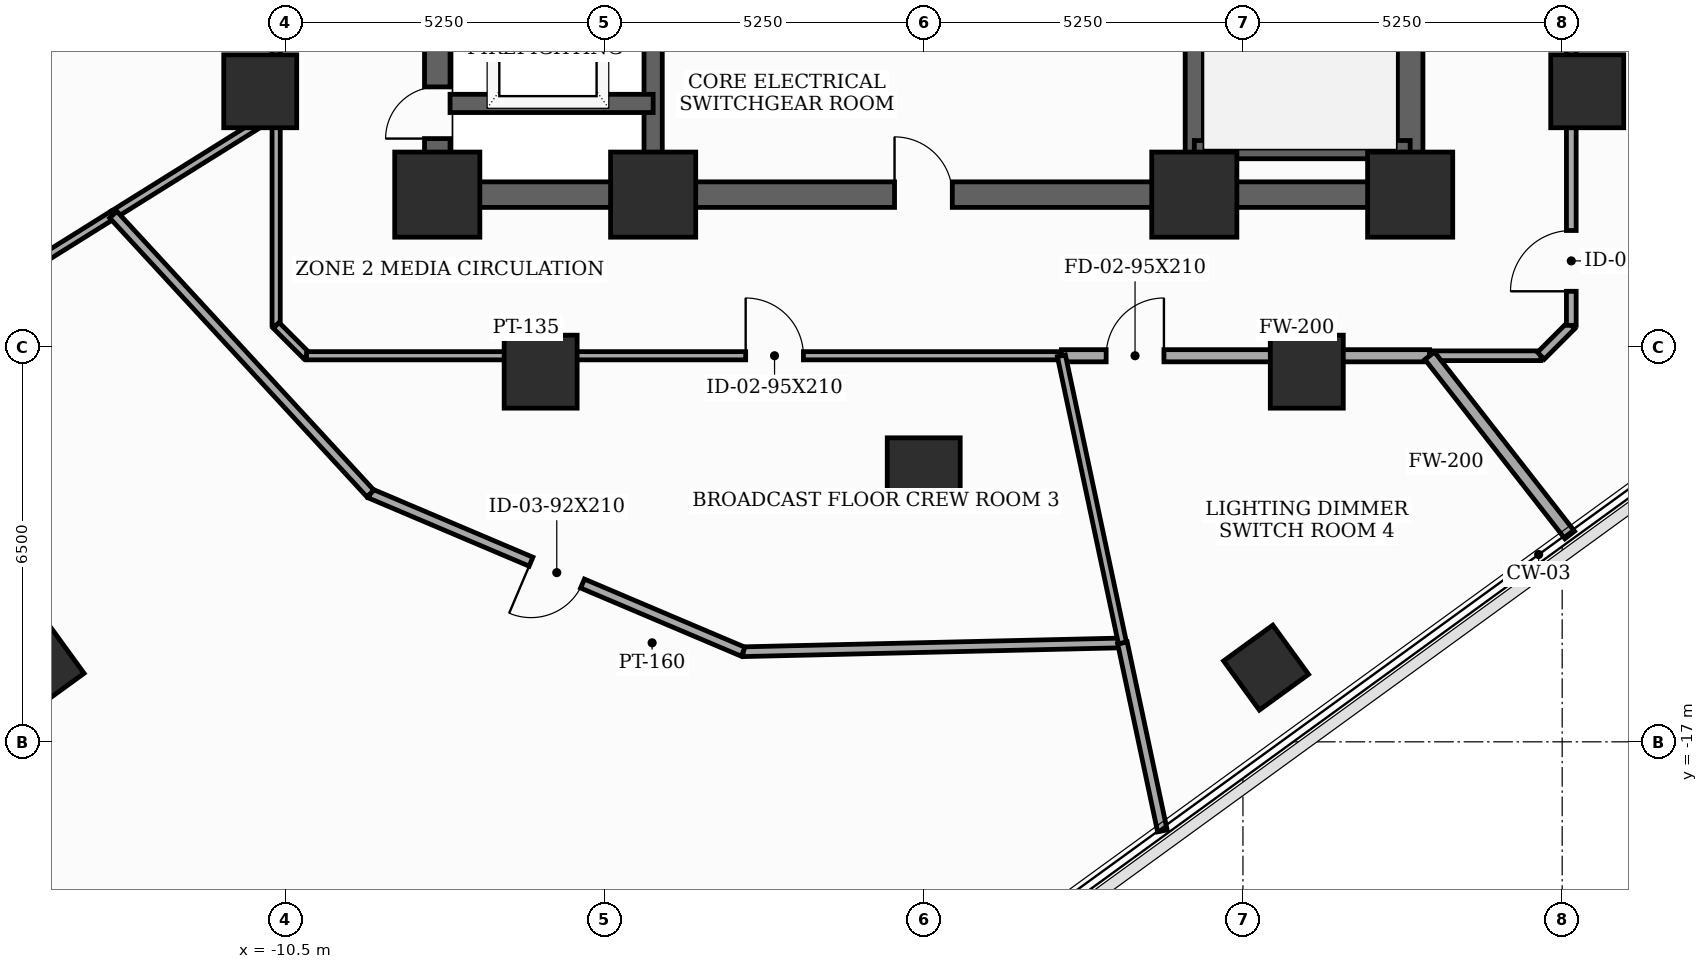
"""IFC4 building model, lengths in metres.
Left out: names, types, materials, properties, quantities, classifications, styles, units other than length and angle.
Written with IfcOpenShell. Run it as: python <this file> out.ifc"""

import sys

from ifc_helpers import new_model, si_unit, direction, frame, frame_2d, origin, origin_2d, place, context, subcontext, project, spatial, rectangle, extrude, element, fill, save


model = new_model("IFC4")
c1 = context("Model", 3, precision=1e-05, world=origin(), true_north=direction((0.0, 1.0)))
c2 = subcontext(c1, "Body", "Model", "MODEL_VIEW")
j1 = project(units=[si_unit("LENGTHUNIT", "METRE"), si_unit("PLANEANGLEUNIT", "RADIAN")], contexts=[c1])
p1 = place(None, origin())
s1 = spatial("IfcSite", under=j1, at=p1, CompositionType="ELEMENT")
p2 = place(p1, origin())
s2 = spatial("IfcBuilding", under=s1, at=p2, CompositionType="ELEMENT")
p3 = place(p2, frame((0.0, 0.0, 154.6)))
s3 = spatial("IfcBuildingStorey", under=s2, at=p3, CompositionType="ELEMENT", Elevation=154.6)
for number, where, z_axis, x_axis in (
    (1, (-8.0, -8.0, 0.0), (0.0, 0.0, 1.0), (1.0, 0.0, 0.0)),
    (2, (-4.45, -8.0, 0.0), (0.0, 0.0, 1.0), (1.0, 0.0, 0.0)),
    (3, (4.45, -8.0, 0.0), (0.0, 0.0, 1.0), (1.0, 0.0, 0.0)),
    (4, (8.0, -8.0, 0.0), (0.0, 0.0, 1.0), (1.0, 0.0, 0.0)),
):
    element("IfcColumn", number, at=place(p3, frame(where, z_axis=z_axis, x_axis=x_axis)), inside=s3, PredefinedType="COLUMN", context=c2, shape_type="SweptSolid", body=[
        extrude(rectangle(XDim=1.4, YDim=1.4, at=origin_2d()), origin(), (0.0, 0.0, 1.0), 3.7),
    ])
for number, where, z_axis, x_axis in (
    (5, (-10.912, -6.3, 0.0), (0.0, 0.0, 1.0), (1.0, 0.0, 0.0)),
    (6, (-6.3, -10.912, 0.0), (0.0, 0.0, 1.0), (1.0, 0.0, 0.0)),
    (7, (0.0, -12.6, 0.0), (0.0, 0.0, 1.0), (1.0, 0.0, 0.0)),
    (8, (6.3, -10.912, 0.0), (0.0, 0.0, 1.0), (1.0, 0.0, 0.0)),
    (9, (10.912, -6.3, 0.0), (0.0, 0.0, 1.0), (1.0, 0.0, 0.0)),
):
    element("IfcColumn", number, at=place(p3, frame(where, z_axis=z_axis, x_axis=x_axis)), inside=s3, PredefinedType="COLUMN", context=c2, shape_type="SweptSolid", body=[
        extrude(rectangle(XDim=1.2, YDim=1.2, at=origin_2d()), origin(), (0.0, 0.0, 1.0), 3.7),
    ])
for number, where, z_axis, x_axis in (
    (10, (5.63, -15.78, 0.0), (0.0, 0.0, 1.0), (0.809, 0.588, 0.0)),
    (11, (-14.507, -15.763, 0.0), (0.0, 0.0, 1.0), (0.809, 0.588, 0.0)),
):
    element("IfcColumn", number, at=place(p3, frame(where, z_axis=z_axis, x_axis=x_axis)), inside=s3, PredefinedType="COLUMN", context=c2, shape_type="SweptSolid", body=[
        extrude(rectangle(XDim=1.0, YDim=1.0, at=origin_2d()), origin(), (0.0, 0.0, 1.0), 3.7),
    ])
p4 = place(p3, frame((-8.0, -8.0, 0.0), z_axis=(0.0, 0.0, 1.0), x_axis=(0.0, 1.0, 0.0)))
e12 = element("IfcWall", 12, at=p4, inside=s3, PredefinedType="SHEAR", context=c2, shape_type="SweptSolid", body=[
    extrude(rectangle(XDim=16.0, YDim=0.42, at=frame_2d((8.0, 0.0))), origin(), (0.0, 0.0, 1.0), 3.5),
])
p5 = place(p4, frame((0.922, 0.0, 0.0)))
e13 = element("IfcOpeningElement", 13, at=p5, cuts=e12, PredefinedType="OPENING", context=c2, shape_type="SweptSolid", body=[
    extrude(rectangle(XDim=0.85, YDim=2.02, at=frame_2d((0.425, 1.01))), frame((0.0, 0.22, 0.0), z_axis=(0.0, -1.0, 0.0), x_axis=(1.0, 0.0, 0.0)), (0.0, 0.0, 1.0), 0.44),
])
p6 = place(p4, frame((5.35, 0.0, 0.0)))
e14 = element("IfcOpeningElement", 14, at=p6, cuts=e12, PredefinedType="OPENING", context=c2, shape_type="SweptSolid", body=[
    extrude(rectangle(XDim=1.05, YDim=2.15, at=frame_2d((0.525, 1.075))), frame((0.0, 0.22, 0.0), z_axis=(0.0, -1.0, 0.0), x_axis=(1.0, 0.0, 0.0)), (0.0, 0.0, 1.0), 0.44),
])
p7 = place(p3, frame((8.0, -8.0, 0.0), z_axis=(0.0, 0.0, 1.0), x_axis=(0.0, 1.0, 0.0)))
e15 = element("IfcWall", 15, at=p7, inside=s3, PredefinedType="SHEAR", context=c2, shape_type="SweptSolid", body=[
    extrude(rectangle(XDim=16.0, YDim=0.42, at=frame_2d((8.0, 0.0))), origin(), (0.0, 0.0, 1.0), 3.5),
])
p8 = place(p7, frame((9.6, 0.0, 0.0)))
e16 = element("IfcOpeningElement", 16, at=p8, cuts=e15, PredefinedType="OPENING", context=c2, shape_type="SweptSolid", body=[
    extrude(rectangle(XDim=1.05, YDim=2.15, at=frame_2d((0.525, 1.075))), frame((0.0, 0.22, 0.0), z_axis=(0.0, -1.0, 0.0), x_axis=(1.0, 0.0, 0.0)), (0.0, 0.0, 1.0), 0.44),
])
p9 = place(p7, frame((14.229, 0.0, 0.0)))
e17 = element("IfcOpeningElement", 17, at=p9, cuts=e15, PredefinedType="OPENING", context=c2, shape_type="SweptSolid", body=[
    extrude(rectangle(XDim=0.85, YDim=2.02, at=frame_2d((0.425, 1.01))), frame((0.0, 0.22, 0.0), z_axis=(0.0, -1.0, 0.0), x_axis=(1.0, 0.0, 0.0)), (0.0, 0.0, 1.0), 0.44),
])
p10 = place(p3, frame((-8.0, -8.0, 0.0), z_axis=(0.0, 0.0, 1.0), x_axis=(1.0, 0.0, 0.0)))
e18 = element("IfcWall", 18, at=p10, inside=s3, PredefinedType="SHEAR", context=c2, shape_type="SweptSolid", body=[
    extrude(rectangle(XDim=16.0, YDim=0.42, at=frame_2d((8.0, 0.0))), origin(), (0.0, 0.0, 1.0), 3.5),
])
p11 = place(p10, frame((7.52, 0.0, 0.0)))
e19 = element("IfcOpeningElement", 19, at=p11, cuts=e18, PredefinedType="OPENING", context=c2, shape_type="SweptSolid", body=[
    extrude(rectangle(XDim=0.95, YDim=2.1, at=frame_2d((0.475, 1.05))), frame((0.0, 0.22, 0.0), z_axis=(0.0, -1.0, 0.0), x_axis=(1.0, 0.0, 0.0)), (0.0, 0.0, 1.0), 0.44),
])
for number, where, z_axis, x_axis in (
    (20, (-4.45, -7.79, 0.0), (0.0, 0.0, 1.0), (0.0, 1.0, 0.0)),
    (21, (4.45, -7.79, 0.0), (0.0, 0.0, 1.0), (0.0, 1.0, 0.0)),
):
    element("IfcWall", number, at=place(p3, frame(where, z_axis=z_axis, x_axis=x_axis)), inside=s3, PredefinedType="SHEAR", context=c2, shape_type="SweptSolid", body=[
        extrude(rectangle(XDim=15.58, YDim=0.3, at=frame_2d((7.79, 0.0))), origin(), (0.0, 0.0, 1.0), 3.5),
    ])
p12 = place(p3, frame((4.45, -7.26, 0.0), z_axis=(0.0, 0.0, 1.0), x_axis=(1.0, 0.0, 0.0)))
e22 = element("IfcWall", 22, at=p12, inside=s3, PredefinedType="SHEAR", context=c2, shape_type="SweptSolid", body=[
    extrude(rectangle(XDim=3.55, YDim=0.3, at=frame_2d((1.775, 0.0))), origin(), (0.0, 0.0, 1.0), 3.5),
])
p13 = place(p3, frame((-7.79, -6.5, 0.0), z_axis=(0.0, 0.0, 1.0), x_axis=(1.0, 0.0, 0.0)))
e23 = element("IfcWall", 23, at=p13, inside=s3, PredefinedType="SHEAR", context=c2, shape_type="SweptSolid", body=[
    extrude(rectangle(XDim=3.34, YDim=0.3, at=frame_2d((1.67, 0.0))), origin(), (0.0, 0.0, 1.0), 3.5),
])
p14 = place(p3, frame((-10.65, 4.742, 0.0), z_axis=(0.0, 0.0, 1.0), x_axis=(0.0, -1.0, 0.0)))
e24 = element("IfcWall", 24, at=p14, inside=s3, PredefinedType="PARTITIONING", context=c2, shape_type="SweptSolid", body=[
    extrude(rectangle(XDim=11.397, YDim=0.135, at=frame_2d((5.698, 0.0))), origin(), (0.0, 0.0, 1.0), 2.885),
])
p15 = place(p14, frame((6.591, 0.0, 0.0)))
e25 = element("IfcOpeningElement", 25, at=p15, cuts=e24, PredefinedType="OPENING", context=c2, shape_type="SweptSolid", body=[
    extrude(rectangle(XDim=0.95, YDim=2.1, at=frame_2d((0.475, 1.05))), frame((0.0, 0.077, 0.0), z_axis=(0.0, -1.0, 0.0), x_axis=(1.0, 0.0, 0.0)), (0.0, 0.0, 1.0), 0.155),
])
p16 = place(p3, frame((-10.65, -6.655, 0.0), z_axis=(0.0, 0.0, 1.0), x_axis=(0.0, -1.0, 0.0)))
e26 = element("IfcWall", 26, at=p16, inside=s3, PredefinedType="PARTITIONING", context=c2, shape_type="SweptSolid", body=[
    extrude(rectangle(XDim=3.495, YDim=0.135, at=frame_2d((1.748, 0.0))), origin(), (0.0, 0.0, 1.0), 2.885),
])
p17 = place(p3, frame((-10.65, -10.15, 0.0), z_axis=(0.0, 0.0, 1.0), x_axis=(0.707106781187, -0.707106781187, 0.0)))
e27 = element("IfcWall", 27, at=p17, inside=s3, PredefinedType="PARTITIONING", context=c2, shape_type="SweptSolid", body=[
    extrude(rectangle(XDim=0.707, YDim=0.135, at=frame_2d((0.354, 0.0))), origin(), (0.0, 0.0, 1.0), 3.5),
])
p18 = place(p3, frame((-10.15, -10.65, 0.0), z_axis=(0.0, 0.0, 1.0), x_axis=(1.0, 0.0, 0.0)))
e28 = element("IfcWall", 28, at=p18, inside=s3, PredefinedType="PARTITIONING", context=c2, shape_type="SweptSolid", body=[
    extrude(rectangle(XDim=12.414, YDim=0.135, at=frame_2d((6.207, 0.0))), origin(), (0.0, 0.0, 1.0), 2.885),
])
p19 = place(p18, frame((7.222, 0.0, 0.0)))
e29 = element("IfcOpeningElement", 29, at=p19, cuts=e28, PredefinedType="OPENING", context=c2, shape_type="SweptSolid", body=[
    extrude(rectangle(XDim=0.95, YDim=2.1, at=frame_2d((0.475, 1.05))), frame((0.0, 0.077, 0.0), z_axis=(0.0, -1.0, 0.0), x_axis=(1.0, 0.0, 0.0)), (0.0, 0.0, 1.0), 0.155),
])
p20 = place(p3, frame((2.264, -10.65, 0.0), z_axis=(0.0, 0.0, 1.0), x_axis=(1.0, 0.0, 0.0)))
e30 = element("IfcWall", 30, at=p20, inside=s3, PredefinedType="SOLIDWALL", context=c2, shape_type="SweptSolid", body=[
    extrude(rectangle(XDim=6.057, YDim=0.2, at=frame_2d((3.029, 0.0))), origin(), (0.0, 0.0, 1.0), 2.885),
])
p21 = place(p20, frame((0.736, 0.0, 0.0)))
e31 = element("IfcOpeningElement", 31, at=p21, cuts=e30, PredefinedType="OPENING", context=c2, shape_type="SweptSolid", body=[
    extrude(rectangle(XDim=0.95, YDim=2.1, at=frame_2d((0.475, 1.05))), frame((0.0, 0.11, 0.0), z_axis=(0.0, -1.0, 0.0), x_axis=(1.0, 0.0, 0.0)), (0.0, 0.0, 1.0), 0.22),
])
p22 = place(p3, frame((8.321, -10.65, 0.0), z_axis=(0.0, 0.0, 1.0), x_axis=(1.0, 0.0, 0.0)))
e32 = element("IfcWall", 32, at=p22, inside=s3, PredefinedType="PARTITIONING", context=c2, shape_type="SweptSolid", body=[
    extrude(rectangle(XDim=1.829, YDim=0.16, at=frame_2d((0.915, 0.0))), origin(), (0.0, 0.0, 1.0), 3.5),
])
p23 = place(p3, frame((10.15, -10.65, 0.0), z_axis=(0.0, 0.0, 1.0), x_axis=(0.707106781187, 0.707106781187, 0.0)))
e33 = element("IfcWall", 33, at=p23, inside=s3, PredefinedType="PARTITIONING", context=c2, shape_type="SweptSolid", body=[
    extrude(rectangle(XDim=0.707, YDim=0.16, at=frame_2d((0.354, 0.0))), origin(), (0.0, 0.0, 1.0), 3.5),
])
p24 = place(p3, frame((10.65, -10.15, 0.0), z_axis=(0.0, 0.0, 1.0), x_axis=(0.0, 1.0, 0.0)))
e34 = element("IfcWall", 34, at=p24, inside=s3, PredefinedType="PARTITIONING", context=c2, shape_type="SweptSolid", body=[
    extrude(rectangle(XDim=5.3, YDim=0.16, at=frame_2d((2.65, 0.0))), origin(), (0.0, 0.0, 1.0), 2.875),
])
p25 = place(p24, frame((0.56, 0.0, 0.0)))
e35 = element("IfcOpeningElement", 35, at=p25, cuts=e34, PredefinedType="OPENING", context=c2, shape_type="SweptSolid", body=[
    extrude(rectangle(XDim=1.0, YDim=2.15, at=frame_2d((0.5, 1.075))), frame((0.0, 0.09, 0.0), z_axis=(0.0, -1.0, 0.0), x_axis=(1.0, 0.0, 0.0)), (0.0, 0.0, 1.0), 0.18),
])
p26 = place(p3, frame((-16.272, -10.167, 0.0), z_axis=(0.0, 0.0, 1.0), x_axis=(0.848097115085, 0.529840809474, 0.0)))
e36 = element("IfcWall", 36, at=p26, inside=s3, PredefinedType="PARTITIONING", context=c2, shape_type="SweptSolid", body=[
    extrude(rectangle(XDim=3.47, YDim=0.135, at=frame_2d((1.735, 0.0))), origin(), (0.0, 0.0, 1.0), 2.985),
])
p27 = place(p3, frame((-13.329, -8.329, 0.0), z_axis=(0.0, 0.0, 1.0), x_axis=(0.848059079617, 0.529901686617, 0.0)))
e37 = element("IfcWall", 37, at=p27, inside=s3, PredefinedType="PARTITIONING", context=c2, shape_type="SweptSolid", body=[
    extrude(rectangle(XDim=3.159, YDim=0.135, at=frame_2d((1.58, 0.0))), origin(), (0.0, 0.0, 1.0), 2.885),
])
p28 = place(p3, frame((3.268, -15.373, 0.0), z_axis=(0.0, 0.0, 1.0), x_axis=(-0.99972988351, -0.023241342836, 0.0)))
e38 = element("IfcWall", 38, at=p28, inside=s3, PredefinedType="PARTITIONING", context=c2, shape_type="SweptSolid", body=[
    extrude(rectangle(XDim=6.24, YDim=0.16, at=frame_2d((3.12, 0.0))), origin(), (0.0, 0.0, 1.0), 2.885),
])
p29 = place(p3, frame((-2.97, -15.518, 0.0), z_axis=(0.0, 0.0, 1.0), x_axis=(-0.920506675175, 0.390726836752, 0.0)))
e39 = element("IfcWall", 39, at=p29, inside=s3, PredefinedType="PARTITIONING", context=c2, shape_type="SweptSolid", body=[
    extrude(rectangle(XDim=6.659, YDim=0.16, at=frame_2d((3.33, 0.0))), origin(), (0.0, 0.0, 1.0), 3.5),
])
p30 = place(p29, frame((2.87, 0.0, 0.0)))
e40 = element("IfcOpeningElement", 40, at=p30, cuts=e39, PredefinedType="OPENING", context=c2, shape_type="SweptSolid", body=[
    extrude(rectangle(XDim=0.92, YDim=2.1, at=frame_2d((0.46, 1.05))), frame((0.0, 0.09, 0.0), z_axis=(0.0, -1.0, 0.0), x_axis=(1.0, 0.0, 0.0)), (0.0, 0.0, 1.0), 0.18),
])
p31 = place(p3, frame((-9.1, -12.916, 0.0), z_axis=(0.0, 0.0, 1.0), x_axis=(-0.677841155448, 0.735208384052, 0.0)))
e41 = element("IfcWall", 41, at=p31, inside=s3, PredefinedType="PARTITIONING", context=c2, shape_type="SweptSolid", body=[
    extrude(rectangle(XDim=6.239, YDim=0.16, at=frame_2d((3.12, 0.0))), origin(), (0.0, 0.0, 1.0), 2.885),
])
p32 = place(p3, frame((3.925, -18.465, 0.0), z_axis=(0.0, 0.0, 1.0), x_axis=(-0.207851365584, 0.978160421314, 0.0)))
e42 = element("IfcWall", 42, at=p32, inside=s3, PredefinedType="PARTITIONING", context=c2, shape_type="SweptSolid", body=[
    extrude(rectangle(XDim=3.161, YDim=0.16, at=frame_2d((1.581, 0.0))), origin(), (0.0, 0.0, 1.0), 2.985),
])
p33 = place(p3, frame((3.268, -15.373, 0.0), z_axis=(0.0, 0.0, 1.0), x_axis=(-0.207954296991, 0.978138543542, 0.0)))
e43 = element("IfcWall", 43, at=p33, inside=s3, PredefinedType="PARTITIONING", context=c2, shape_type="SweptSolid", body=[
    extrude(rectangle(XDim=4.829, YDim=0.135, at=frame_2d((2.414, 0.0))), origin(), (0.0, 0.0, 1.0), 2.885),
])
p34 = place(p3, frame((10.624, -13.598, 0.0), z_axis=(0.0, 0.0, 1.0), x_axis=(-0.615579447743, 0.788074833704, 0.0)))
e44 = element("IfcWall", 44, at=p34, inside=s3, PredefinedType="SOLIDWALL", context=c2, shape_type="SweptSolid", body=[
    extrude(rectangle(XDim=3.741, YDim=0.2, at=frame_2d((1.87, 0.0))), origin(), (0.0, 0.0, 1.0), 2.975),
])
p35 = place(p5, origin())
e45 = element("IfcDoor", 45, at=p35, inside=s3, OperationType="SINGLE_SWING_LEFT", PredefinedType="TRAPDOOR", context=c2, shape_type="SweptSolid", body=[
    extrude(rectangle(XDim=0.85, YDim=2.02, at=frame_2d((0.425, 1.01))), frame((0.0, 0.025, 0.0), z_axis=(0.0, -1.0, 0.0), x_axis=(1.0, 0.0, 0.0)), (0.0, 0.0, 1.0), 0.05),
])
fill(e13, e45)
p36 = place(p11, origin())
e46 = element("IfcDoor", 46, at=p36, inside=s3, OperationType="SINGLE_SWING_LEFT", PredefinedType="DOOR", context=c2, shape_type="SweptSolid", body=[
    extrude(rectangle(XDim=0.95, YDim=2.1, at=frame_2d((0.475, 1.05))), frame((0.0, 0.025, 0.0), z_axis=(0.0, -1.0, 0.0), x_axis=(1.0, 0.0, 0.0)), (0.0, 0.0, 1.0), 0.05),
])
fill(e19, e46)
p37 = place(p19, origin())
e47 = element("IfcDoor", 47, at=p37, inside=s3, OperationType="SINGLE_SWING_LEFT", PredefinedType="DOOR", context=c2, shape_type="SweptSolid", body=[
    extrude(rectangle(XDim=0.95, YDim=2.1, at=frame_2d((0.475, 1.05))), frame((0.0, 0.025, 0.0), z_axis=(0.0, -1.0, 0.0), x_axis=(1.0, 0.0, 0.0)), (0.0, 0.0, 1.0), 0.05),
])
fill(e29, e47)
p38 = place(p21, origin())
e48 = element("IfcDoor", 48, at=p38, inside=s3, OperationType="SINGLE_SWING_RIGHT", PredefinedType="DOOR", context=c2, shape_type="SweptSolid", body=[
    extrude(rectangle(XDim=0.95, YDim=2.1, at=frame_2d((0.475, 1.05))), frame((0.0, 0.025, 0.0), z_axis=(0.0, -1.0, 0.0), x_axis=(1.0, 0.0, 0.0)), (0.0, 0.0, 1.0), 0.05),
])
fill(e31, e48)
p39 = place(p25, origin())
e49 = element("IfcDoor", 49, at=p39, inside=s3, OperationType="SINGLE_SWING_LEFT", PredefinedType="DOOR", context=c2, shape_type="SweptSolid", body=[
    extrude(rectangle(XDim=1.0, YDim=2.15, at=frame_2d((0.5, 1.075))), frame((0.0, 0.025, 0.0), z_axis=(0.0, -1.0, 0.0), x_axis=(1.0, 0.0, 0.0)), (0.0, 0.0, 1.0), 0.05),
])
fill(e35, e49)
p40 = place(p30, origin())
e50 = element("IfcDoor", 50, at=p40, inside=s3, OperationType="SINGLE_SWING_RIGHT", PredefinedType="DOOR", context=c2, shape_type="SweptSolid", body=[
    extrude(rectangle(XDim=0.92, YDim=2.1, at=frame_2d((0.46, 1.05))), frame((0.0, 0.025, 0.0), z_axis=(0.0, -1.0, 0.0), x_axis=(1.0, 0.0, 0.0)), (0.0, 0.0, 1.0), 0.05),
])
fill(e40, e50)
save(model, sys.argv[1])
